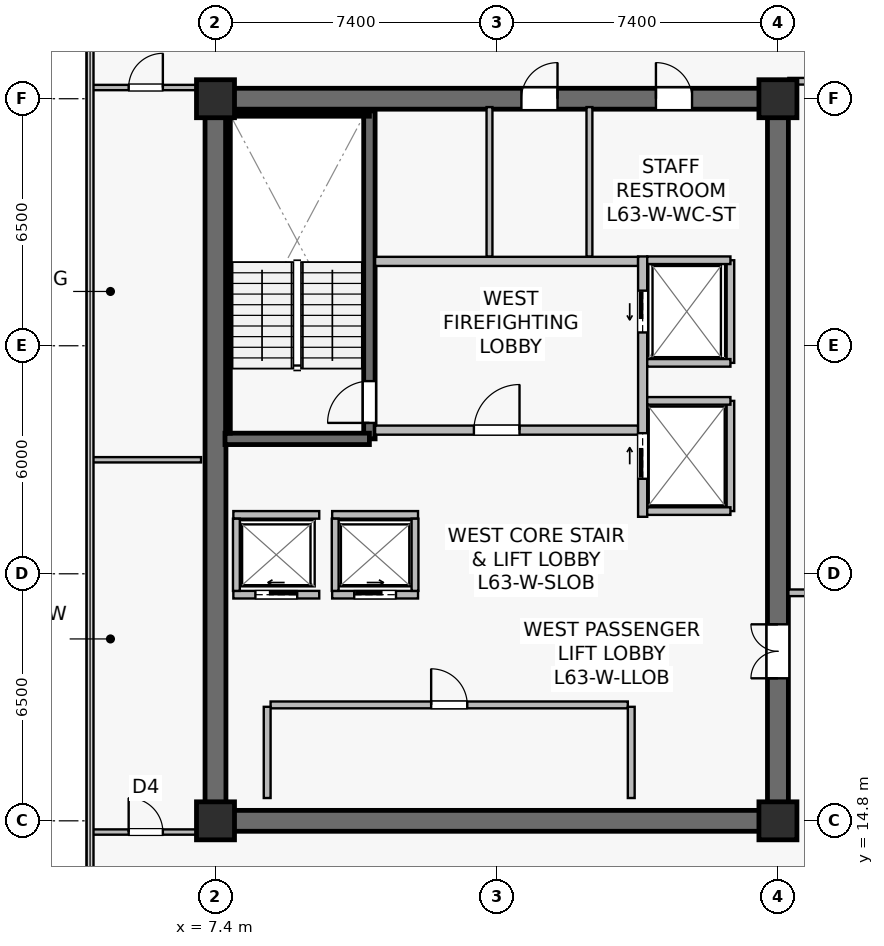
"""IFC4 building model, lengths in metres.
Left out: names, types, materials, properties, quantities, classifications, styles, units other than length and angle.
Written with IfcOpenShell. Run it as: python <this file> out.ifc"""

import sys

from ifc_helpers import new_model, si_unit, direction, frame, frame_2d, origin, origin_2d, place, context, subcontext, project, spatial, rectangle, extrude, source, transform, mapped, element, fill, save


model = new_model("IFC4")
c1 = context("Model", 3, precision=1e-05, world=origin(), true_north=direction((0.0, 1.0)))
c2 = subcontext(c1, "Body", "Model", "MODEL_VIEW")
j1 = project(units=[si_unit("LENGTHUNIT", "METRE"), si_unit("PLANEANGLEUNIT", "RADIAN")], contexts=[c1])
p1 = place(None, origin())
s1 = spatial("IfcSite", under=j1, at=p1, CompositionType="ELEMENT")
p2 = place(p1, origin())
s2 = spatial("IfcBuilding", under=s1, at=p2, CompositionType="ELEMENT")
p3 = place(p2, frame((0.0, 0.0, 262.9)))
s3 = spatial("IfcBuildingStorey", under=s2, at=p3, CompositionType="ELEMENT", Elevation=262.9)
p4 = place(p3, frame((7.125, 14.8, 0.0), z_axis=(0.0, 0.0, 1.0), x_axis=(1.0, 0.0, 0.0)))
e1 = element("IfcWall", 1, at=p4, inside=s3, PredefinedType="SHEAR", context=c2, shape_type="SweptSolid", body=[
    extrude(rectangle(XDim=15.35, YDim=0.55, at=frame_2d((7.675, 0.0))), origin(), (0.0, 0.0, 1.0), 3.8),
])
p5 = place(p3, frame((7.125, 33.8, 0.0), z_axis=(0.0, 0.0, 1.0), x_axis=(1.0, 0.0, 0.0)))
e2 = element("IfcWall", 2, at=p5, inside=s3, PredefinedType="SHEAR", context=c2, shape_type="SweptSolid", body=[
    extrude(rectangle(XDim=15.35, YDim=0.55, at=frame_2d((7.675, 0.0))), origin(), (0.0, 0.0, 1.0), 3.8),
])
p6 = place(p5, frame((8.325, 0.0, 0.0)))
e3 = element("IfcOpeningElement", 3, at=p6, cuts=e2, PredefinedType="OPENING", context=c2, shape_type="SweptSolid", body=[
    extrude(rectangle(XDim=0.95, YDim=2.15, at=frame_2d((0.475, 1.075))), frame((0.0, 0.285, 0.0), z_axis=(0.0, -1.0, 0.0), x_axis=(1.0, 0.0, 0.0)), (0.0, 0.0, 1.0), 0.57),
])
p7 = place(p5, frame((11.865, 0.0, 0.0)))
e4 = element("IfcOpeningElement", 4, at=p7, cuts=e2, PredefinedType="OPENING", context=c2, shape_type="SweptSolid", body=[
    extrude(rectangle(XDim=0.95, YDim=2.15, at=frame_2d((0.475, 1.075))), frame((0.0, 0.285, 0.0), z_axis=(0.0, -1.0, 0.0), x_axis=(1.0, 0.0, 0.0)), (0.0, 0.0, 1.0), 0.57),
])
p8 = place(p3, frame((7.4, 15.075, 0.0), z_axis=(0.0, 0.0, 1.0), x_axis=(0.0, 1.0, 0.0)))
e5 = element("IfcWall", 5, at=p8, inside=s3, PredefinedType="SHEAR", context=c2, shape_type="SweptSolid", body=[
    extrude(rectangle(XDim=18.45, YDim=0.55, at=frame_2d((9.225, 0.0))), origin(), (0.0, 0.0, 1.0), 3.8),
])
p9 = place(p3, frame((22.2, 15.075, 0.0), z_axis=(0.0, 0.0, 1.0), x_axis=(0.0, 1.0, 0.0)))
e6 = element("IfcWall", 6, at=p9, inside=s3, PredefinedType="SHEAR", context=c2, shape_type="SweptSolid", body=[
    extrude(rectangle(XDim=18.45, YDim=0.55, at=frame_2d((9.225, 0.0))), origin(), (0.0, 0.0, 1.0), 3.8),
])
p10 = place(p9, frame((3.475, 0.0, 0.0)))
e7 = element("IfcOpeningElement", 7, at=p10, cuts=e6, PredefinedType="OPENING", context=c2, shape_type="SweptSolid", body=[
    extrude(rectangle(XDim=1.42, YDim=2.2, at=frame_2d((0.71, 1.1))), frame((0.0, 0.285, 0.0), z_axis=(0.0, -1.0, 0.0), x_axis=(1.0, 0.0, 0.0)), (0.0, 0.0, 1.0), 0.57),
])
p11 = place(p3, frame((11.45, 24.85, 0.0), z_axis=(0.0, 0.0, 1.0), x_axis=(0.0, 1.0, 0.0)))
e8 = element("IfcWall", 8, at=p11, inside=s3, PredefinedType="SHEAR", context=c2, shape_type="SweptSolid", body=[
    extrude(rectangle(XDim=8.63, YDim=0.3, at=frame_2d((4.315, 0.0))), origin(), (0.0, 0.0, 1.0), 3.8),
])
p12 = place(p11, frame((0.42, 0.0, 0.0)))
e9 = element("IfcOpeningElement", 9, at=p12, cuts=e8, PredefinedType="OPENING", context=c2, shape_type="SweptSolid", body=[
    extrude(rectangle(XDim=1.1, YDim=2.15, at=frame_2d((0.55, 1.075))), frame((0.0, 0.16, 0.0), z_axis=(0.0, -1.0, 0.0), x_axis=(1.0, 0.0, 0.0)), (0.0, 0.0, 1.0), 0.32),
])
p13 = place(p3, frame((7.65, 24.85, 0.0), z_axis=(0.0, 0.0, 1.0), x_axis=(1.0, 0.0, 0.0)))
e10 = element("IfcWall", 10, at=p13, inside=s3, PredefinedType="SHEAR", context=c2, shape_type="SweptSolid", body=[
    extrude(rectangle(XDim=3.8, YDim=0.3, at=frame_2d((1.9, 0.0))), origin(), (0.0, 0.0, 1.0), 3.8),
])
p14 = place(p3, frame((7.73, 33.4, 0.0), z_axis=(0.0, 0.0, 1.0), x_axis=(1.0, 0.0, 0.0)))
e11 = element("IfcWall", 11, at=p14, inside=s3, PredefinedType="SOLIDWALL", context=c2, shape_type="SweptSolid", body=[
    extrude(rectangle(XDim=3.72, YDim=0.12, at=frame_2d((1.86, 0.0))), origin(), (0.0, 0.0, 1.0), 3.8),
])
p15 = place(p3, frame((7.73, 25.0, 0.0), z_axis=(0.0, 0.0, 1.0), x_axis=(0.0, 1.0, 0.0)))
e12 = element("IfcWall", 12, at=p15, inside=s3, PredefinedType="SOLIDWALL", context=c2, shape_type="SweptSolid", body=[
    extrude(rectangle(XDim=8.32, YDim=0.12, at=frame_2d((4.16, 0.0))), origin(), (0.0, 0.0, 1.0), 3.8),
])
m1 = source(origin(), c2, "Body", "SweptSolid", [
    extrude(rectangle(XDim=1.0, YDim=1.0, at=origin_2d()), origin(), (0.0, 0.0, 1.0), 4.1),
])
for number, where, z_axis, x_axis in (
    (13, (7.4, 14.8, 0.0), (0.0, 0.0, 1.0), (1.0, 0.0, 0.0)),
    (14, (22.2, 14.8, 0.0), (0.0, 0.0, 1.0), (1.0, 0.0, 0.0)),
    (15, (7.4, 33.8, 0.0), (0.0, 0.0, 1.0), (1.0, 0.0, 0.0)),
    (16, (22.2, 33.8, 0.0), (0.0, 0.0, 1.0), (1.0, 0.0, 0.0)),
):
    element("IfcColumn", number, at=place(p3, frame(where, z_axis=z_axis, x_axis=x_axis)), inside=s3, PredefinedType="COLUMN", context=c2, shape_type="MappedRepresentation", body=[
        mapped(m1, transform((0.0, 0.0, 0.0), scale=1.0)),
    ])
p16 = place(p3, frame((11.6, 25.08, 0.0), z_axis=(0.0, 0.0, 1.0), x_axis=(1.0, 0.0, 0.0)))
e17 = element("IfcWall", 17, at=p16, inside=s3, PredefinedType="SOLIDWALL", context=c2, shape_type="SweptSolid", body=[
    extrude(rectangle(XDim=6.92, YDim=0.24, at=frame_2d((3.46, 0.0))), origin(), (0.0, 0.0, 1.0), 3.197),
])
p17 = place(p16, frame((2.6, 0.0, 0.0)))
e18 = element("IfcOpeningElement", 18, at=p17, cuts=e17, PredefinedType="OPENING", context=c2, shape_type="SweptSolid", body=[
    extrude(rectangle(XDim=1.2, YDim=2.16, at=frame_2d((0.6, 1.08))), frame((0.0, 0.13, 0.0), z_axis=(0.0, -1.0, 0.0), x_axis=(1.0, 0.0, 0.0)), (0.0, 0.0, 1.0), 0.26),
])
p18 = place(p3, frame((11.6, 29.52, 0.0), z_axis=(0.0, 0.0, 1.0), x_axis=(1.0, 0.0, 0.0)))
e19 = element("IfcWall", 19, at=p18, inside=s3, PredefinedType="SOLIDWALL", context=c2, shape_type="SweptSolid", body=[
    extrude(rectangle(XDim=6.92, YDim=0.24, at=frame_2d((3.46, 0.0))), origin(), (0.0, 0.0, 1.0), 3.197),
])
p19 = place(p3, frame((18.64, 22.8, 0.0), z_axis=(0.0, 0.0, 1.0), x_axis=(0.0, 1.0, 0.0)))
e20 = element("IfcWall", 20, at=p19, inside=s3, PredefinedType="SOLIDWALL", context=c2, shape_type="SweptSolid", body=[
    extrude(rectangle(XDim=6.85, YDim=0.24, at=frame_2d((3.425, 0.0))), origin(), (0.0, 0.0, 1.0), 2.935),
])
p20 = place(p19, frame((4.85, 0.0, 0.0)))
e21 = element("IfcOpeningElement", 21, at=p20, cuts=e20, PredefinedType="OPENING", context=c2, shape_type="SweptSolid", body=[
    extrude(rectangle(XDim=1.1, YDim=2.22, at=frame_2d((0.55, 1.11))), frame((0.0, 0.13, 0.0), z_axis=(0.0, -1.0, 0.0), x_axis=(1.0, 0.0, 0.0)), (0.0, 0.0, 1.0), 0.26),
])
p21 = place(p19, frame((1.0, 0.0, 0.0)))
e22 = element("IfcOpeningElement", 22, at=p21, cuts=e20, PredefinedType="OPENING", context=c2, shape_type="SweptSolid", body=[
    extrude(rectangle(XDim=1.2, YDim=2.22, at=frame_2d((0.6, 1.11))), frame((0.0, 0.13, 0.0), z_axis=(0.0, -1.0, 0.0), x_axis=(1.0, 0.0, 0.0)), (0.0, 0.0, 1.0), 0.26),
])
p22 = place(p3, frame((7.87, 20.75, 0.0), z_axis=(0.0, 0.0, 1.0), x_axis=(1.0, 0.0, 0.0)))
e23 = element("IfcWall", 23, at=p22, inside=s3, PredefinedType="SOLIDWALL", context=c2, shape_type="SweptSolid", body=[
    extrude(rectangle(XDim=2.26, YDim=0.2, at=frame_2d((1.13, 0.0))), origin(), (0.0, 0.0, 1.0), 3.8),
])
p23 = place(p22, frame((0.58, 0.0, 0.0)))
e24 = element("IfcOpeningElement", 24, at=p23, cuts=e23, PredefinedType="OPENING", context=c2, shape_type="SweptSolid", body=[
    extrude(rectangle(XDim=1.1, YDim=2.22, at=frame_2d((0.55, 1.11))), frame((0.0, 0.11, 0.0), z_axis=(0.0, -1.0, 0.0), x_axis=(1.0, 0.0, 0.0)), (0.0, 0.0, 1.0), 0.22),
])
p24 = place(p3, frame((7.87, 22.85, 0.0), z_axis=(0.0, 0.0, 1.0), x_axis=(1.0, 0.0, 0.0)))
e25 = element("IfcWall", 25, at=p24, inside=s3, PredefinedType="SOLIDWALL", context=c2, shape_type="SweptSolid", body=[
    extrude(rectangle(XDim=2.26, YDim=0.2, at=frame_2d((1.13, 0.0))), origin(), (0.0, 0.0, 1.0), 3.8),
])
p25 = place(p3, frame((7.95, 20.85, 0.0), z_axis=(0.0, 0.0, 1.0), x_axis=(0.0, 1.0, 0.0)))
e26 = element("IfcWall", 26, at=p25, inside=s3, PredefinedType="SOLIDWALL", context=c2, shape_type="SweptSolid", body=[
    extrude(rectangle(XDim=1.9, YDim=0.18, at=frame_2d((0.95, 0.0))), origin(), (0.0, 0.0, 1.0), 3.8),
])
p26 = place(p3, frame((10.47, 20.75, 0.0), z_axis=(0.0, 0.0, 1.0), x_axis=(1.0, 0.0, 0.0)))
e27 = element("IfcWall", 27, at=p26, inside=s3, PredefinedType="SOLIDWALL", context=c2, shape_type="SweptSolid", body=[
    extrude(rectangle(XDim=2.26, YDim=0.2, at=frame_2d((1.13, 0.0))), origin(), (0.0, 0.0, 1.0), 3.8),
])
p27 = place(p26, frame((0.58, 0.0, 0.0)))
e28 = element("IfcOpeningElement", 28, at=p27, cuts=e27, PredefinedType="OPENING", context=c2, shape_type="SweptSolid", body=[
    extrude(rectangle(XDim=1.1, YDim=2.22, at=frame_2d((0.55, 1.11))), frame((0.0, 0.11, 0.0), z_axis=(0.0, -1.0, 0.0), x_axis=(1.0, 0.0, 0.0)), (0.0, 0.0, 1.0), 0.22),
])
p28 = place(p3, frame((10.47, 22.85, 0.0), z_axis=(0.0, 0.0, 1.0), x_axis=(1.0, 0.0, 0.0)))
e29 = element("IfcWall", 29, at=p28, inside=s3, PredefinedType="SOLIDWALL", context=c2, shape_type="SweptSolid", body=[
    extrude(rectangle(XDim=2.26, YDim=0.2, at=frame_2d((1.13, 0.0))), origin(), (0.0, 0.0, 1.0), 3.8),
])
for number, where, z_axis, x_axis in (
    (30, (10.55, 20.85, 0.0), (0.0, 0.0, 1.0), (0.0, 1.0, 0.0)),
    (31, (12.65, 20.85, 0.0), (0.0, 0.0, 1.0), (0.0, 1.0, 0.0)),
):
    element("IfcWall", number, at=place(p3, frame(where, z_axis=z_axis, x_axis=x_axis)), inside=s3, PredefinedType="SOLIDWALL", context=c2, shape_type="SweptSolid", body=[
        extrude(rectangle(XDim=1.9, YDim=0.18, at=frame_2d((0.95, 0.0))), origin(), (0.0, 0.0, 1.0), 3.8),
    ])
p29 = place(p3, frame((20.95, 26.85, 0.0), z_axis=(0.0, 0.0, 1.0), x_axis=(0.0, 1.0, 0.0)))
e32 = element("IfcWall", 32, at=p29, inside=s3, PredefinedType="SOLIDWALL", context=c2, shape_type="SweptSolid", body=[
    extrude(rectangle(XDim=2.7, YDim=0.2, at=frame_2d((1.35, 0.0))), origin(), (0.0, 0.0, 1.0), 3.8),
])
p30 = place(p3, frame((18.76, 29.55, 0.0), z_axis=(0.0, 0.0, 1.0), x_axis=(1.0, 0.0, 0.0)))
e33 = element("IfcWall", 33, at=p30, inside=s3, PredefinedType="SOLIDWALL", context=c2, shape_type="SweptSolid", body=[
    extrude(rectangle(XDim=2.19, YDim=0.2, at=frame_2d((1.095, 0.0))), origin(), (0.0, 0.0, 1.0), 3.8),
])
p31 = place(p3, frame((18.76, 26.85, 0.0), z_axis=(0.0, 0.0, 1.0), x_axis=(1.0, 0.0, 0.0)))
e34 = element("IfcWall", 34, at=p31, inside=s3, PredefinedType="SOLIDWALL", context=c2, shape_type="SweptSolid", body=[
    extrude(rectangle(XDim=2.19, YDim=0.2, at=frame_2d((1.095, 0.0))), origin(), (0.0, 0.0, 1.0), 3.197),
])
p32 = place(p3, frame((20.95, 22.95, 0.0), z_axis=(0.0, 0.0, 1.0), x_axis=(0.0, 1.0, 0.0)))
e35 = element("IfcWall", 35, at=p32, inside=s3, PredefinedType="SOLIDWALL", context=c2, shape_type="SweptSolid", body=[
    extrude(rectangle(XDim=2.9, YDim=0.2, at=frame_2d((1.45, 0.0))), origin(), (0.0, 0.0, 1.0), 2.935),
])
for number, where, z_axis, x_axis in (
    (36, (18.76, 25.85, 0.0), (0.0, 0.0, 1.0), (1.0, 0.0, 0.0)),
    (37, (18.76, 22.95, 0.0), (0.0, 0.0, 1.0), (1.0, 0.0, 0.0)),
):
    element("IfcWall", number, at=place(p3, frame(where, z_axis=z_axis, x_axis=x_axis)), inside=s3, PredefinedType="SOLIDWALL", context=c2, shape_type="SweptSolid", body=[
        extrude(rectangle(XDim=2.19, YDim=0.2, at=frame_2d((1.095, 0.0))), origin(), (0.0, 0.0, 1.0), 3.8),
    ])
p33 = place(p3, frame((8.85, 17.85, 0.0), z_axis=(0.0, 0.0, 1.0), x_axis=(1.0, 0.0, 0.0)))
e38 = element("IfcWall", 38, at=p33, inside=s3, PredefinedType="SOLIDWALL", context=c2, shape_type="SweptSolid", body=[
    extrude(rectangle(XDim=9.4, YDim=0.18, at=frame_2d((4.7, 0.0))), origin(), (0.0, 0.0, 1.0), 3.197),
])
p34 = place(p33, frame((4.225, 0.0, 0.0)))
e39 = element("IfcOpeningElement", 39, at=p34, cuts=e38, PredefinedType="OPENING", context=c2, shape_type="SweptSolid", body=[
    extrude(rectangle(XDim=0.95, YDim=2.15, at=frame_2d((0.475, 1.075))), frame((0.0, 0.1, 0.0), z_axis=(0.0, -1.0, 0.0), x_axis=(1.0, 0.0, 0.0)), (0.0, 0.0, 1.0), 0.2),
])
for number, where, z_axis, x_axis in (
    (40, (18.34, 15.4, 0.0), (0.0, 0.0, 1.0), (0.0, 1.0, 0.0)),
    (41, (8.76, 15.4, 0.0), (0.0, 0.0, 1.0), (0.0, 1.0, 0.0)),
):
    element("IfcWall", number, at=place(p3, frame(where, z_axis=z_axis, x_axis=x_axis)), inside=s3, PredefinedType="SOLIDWALL", context=c2, shape_type="SweptSolid", body=[
        extrude(rectangle(XDim=2.4, YDim=0.18, at=frame_2d((1.2, 0.0))), origin(), (0.0, 0.0, 1.0), 3.8),
    ])
p35 = place(p3, frame((14.61, 29.65, 0.0), z_axis=(0.0, 0.0, 1.0), x_axis=(0.0, 1.0, 0.0)))
e42 = element("IfcWall", 42, at=p35, inside=s3, PredefinedType="PLUMBINGWALL", context=c2, shape_type="SweptSolid", body=[
    extrude(rectangle(XDim=3.93, YDim=0.155, at=frame_2d((1.965, 0.0))), origin(), (0.0, 0.0, 1.0), 3.197),
])
p36 = place(p3, frame((17.24, 29.65, 0.0), z_axis=(0.0, 0.0, 1.0), x_axis=(0.0, 1.0, 0.0)))
e43 = element("IfcWall", 43, at=p36, inside=s3, PredefinedType="PLUMBINGWALL", context=c2, shape_type="SweptSolid", body=[
    extrude(rectangle(XDim=3.93, YDim=0.155, at=frame_2d((1.965, 0.0))), origin(), (0.0, 0.0, 1.0), 3.8),
])
p37 = place(p3, frame((22.475, 34.26, 0.0), z_axis=(0.0, 0.0, 1.0), x_axis=(1.0, 0.0, 0.0)))
e44 = element("IfcWall", 44, at=p37, inside=s3, PredefinedType="PARTITIONING", context=c2, shape_type="SweptSolid", body=[
    extrude(rectangle(XDim=4.025, YDim=0.175, at=frame_2d((2.012, 0.0))), origin(), (0.0, 0.0, 1.0), 3.535),
])
p38 = place(p3, frame((22.475, 20.8, 0.0), z_axis=(0.0, 0.0, 1.0), x_axis=(1.0, 0.0, 0.0)))
e45 = element("IfcWall", 45, at=p38, inside=s3, PredefinedType="PARTITIONING", context=c2, shape_type="SweptSolid", body=[
    extrude(rectangle(XDim=4.025, YDim=0.175, at=frame_2d((2.012, 0.0))), origin(), (0.0, 0.0, 1.0), 3.8),
])
p39 = place(p38, frame((1.35, 0.0, 0.0)))
e46 = element("IfcOpeningElement", 46, at=p39, cuts=e45, PredefinedType="OPENING", context=c2, shape_type="SweptSolid", body=[
    extrude(rectangle(XDim=0.95, YDim=2.15, at=frame_2d((0.475, 1.075))), frame((0.0, 0.098, 0.0), z_axis=(0.0, -1.0, 0.0), x_axis=(1.0, 0.0, 0.0)), (0.0, 0.0, 1.0), 0.195),
])
p40 = place(p3, frame((4.11, 24.3, 0.0), z_axis=(0.0, 0.0, 1.0), x_axis=(1.0, 0.0, 0.0)))
e47 = element("IfcWall", 47, at=p40, inside=s3, PredefinedType="PARTITIONING", context=c2, shape_type="SweptSolid", body=[
    extrude(rectangle(XDim=2.91, YDim=0.14, at=frame_2d((1.455, 0.0))), origin(), (0.0, 0.0, 1.0), 3.8),
])
p41 = place(p3, frame((4.11, 14.505, 0.0), z_axis=(0.0, 0.0, 1.0), x_axis=(1.0, 0.0, 0.0)))
e48 = element("IfcWall", 48, at=p41, inside=s3, PredefinedType="PARTITIONING", context=c2, shape_type="SweptSolid", body=[
    extrude(rectangle(XDim=2.91, YDim=0.14, at=frame_2d((1.455, 0.0))), origin(), (0.0, 0.0, 1.0), 3.8),
])
p42 = place(p41, frame((1.005, 0.0, 0.0)))
e49 = element("IfcOpeningElement", 49, at=p42, cuts=e48, PredefinedType="OPENING", context=c2, shape_type="SweptSolid", body=[
    extrude(rectangle(XDim=0.9, YDim=2.1, at=frame_2d((0.45, 1.05))), frame((0.0, 0.08, 0.0), z_axis=(0.0, -1.0, 0.0), x_axis=(1.0, 0.0, 0.0)), (0.0, 0.0, 1.0), 0.16),
])
p43 = place(p3, frame((4.11, 34.095, 0.0), z_axis=(0.0, 0.0, 1.0), x_axis=(1.0, 0.0, 0.0)))
e50 = element("IfcWall", 50, at=p43, inside=s3, PredefinedType="PARTITIONING", context=c2, shape_type="SweptSolid", body=[
    extrude(rectangle(XDim=2.91, YDim=0.14, at=frame_2d((1.455, 0.0))), origin(), (0.0, 0.0, 1.0), 3.8),
])
p44 = place(p43, frame((1.005, 0.0, 0.0)))
e51 = element("IfcOpeningElement", 51, at=p44, cuts=e50, PredefinedType="OPENING", context=c2, shape_type="SweptSolid", body=[
    extrude(rectangle(XDim=0.9, YDim=2.1, at=frame_2d((0.45, 1.05))), frame((0.0, 0.08, 0.0), z_axis=(0.0, -1.0, 0.0), x_axis=(1.0, 0.0, 0.0)), (0.0, 0.0, 1.0), 0.16),
])
m2 = source(origin(), c2, "Body", "SweptSolid", [
    extrude(rectangle(XDim=1.1, YDim=2.15, at=frame_2d((0.55, 1.075))), frame((0.0, 0.025, 0.0), z_axis=(0.0, -1.0, 0.0), x_axis=(1.0, 0.0, 0.0)), (0.0, 0.0, 1.0), 0.05),
])
p45 = place(p12, origin())
e52 = element("IfcDoor", 52, at=p45, inside=s3, OperationType="SINGLE_SWING_LEFT", PredefinedType="DOOR", context=c2, shape_type="MappedRepresentation", body=[
    mapped(m2, transform((0.0, 0.0, 0.0), scale=1.0)),
])
fill(e9, e52)
m3 = source(origin(), c2, "Body", "SweptSolid", [
    extrude(rectangle(XDim=1.2, YDim=2.16, at=frame_2d((0.6, 1.08))), frame((0.0, 0.025, 0.0), z_axis=(0.0, -1.0, 0.0), x_axis=(1.0, 0.0, 0.0)), (0.0, 0.0, 1.0), 0.05),
])
p46 = place(p17, origin())
e53 = element("IfcDoor", 53, at=p46, inside=s3, OperationType="SINGLE_SWING_RIGHT", PredefinedType="DOOR", context=c2, shape_type="MappedRepresentation", body=[
    mapped(m3, transform((0.0, 0.0, 0.0), scale=1.0)),
])
fill(e18, e53)
m4 = source(origin(), c2, "Body", "SweptSolid", [
    extrude(rectangle(XDim=1.1, YDim=2.22, at=frame_2d((0.55, 1.11))), frame((0.0, 0.025, 0.0), z_axis=(0.0, -1.0, 0.0), x_axis=(1.0, 0.0, 0.0)), (0.0, 0.0, 1.0), 0.05),
])
p47 = place(p23, origin())
e54 = element("IfcDoor", 54, at=p47, inside=s3, OperationType="SLIDING_TO_LEFT", PredefinedType="USERDEFINED", context=c2, shape_type="MappedRepresentation", body=[
    mapped(m4, transform((0.0, 0.0, 0.0), scale=1.0)),
])
fill(e24, e54)
p48 = place(p27, origin())
e55 = element("IfcDoor", 55, at=p48, inside=s3, OperationType="SLIDING_TO_RIGHT", PredefinedType="USERDEFINED", context=c2, shape_type="MappedRepresentation", body=[
    mapped(m4, transform((0.0, 0.0, 0.0), scale=1.0)),
])
fill(e28, e55)
p49 = place(p20, origin())
e56 = element("IfcDoor", 56, at=p49, inside=s3, OperationType="SLIDING_TO_LEFT", PredefinedType="USERDEFINED", context=c2, shape_type="MappedRepresentation", body=[
    mapped(m4, transform((0.0, 0.0, 0.0), scale=1.0)),
])
fill(e21, e56)
m5 = source(origin(), c2, "Body", "SweptSolid", [
    extrude(rectangle(XDim=1.2, YDim=2.22, at=frame_2d((0.6, 1.11))), frame((0.0, 0.025, 0.0), z_axis=(0.0, -1.0, 0.0), x_axis=(1.0, 0.0, 0.0)), (0.0, 0.0, 1.0), 0.05),
])
p50 = place(p21, origin())
e57 = element("IfcDoor", 57, at=p50, inside=s3, OperationType="SLIDING_TO_RIGHT", PredefinedType="USERDEFINED", context=c2, shape_type="MappedRepresentation", body=[
    mapped(m5, transform((0.0, 0.0, 0.0), scale=1.0)),
])
fill(e22, e57)
m6 = source(origin(), c2, "Body", "SweptSolid", [
    extrude(rectangle(XDim=0.95, YDim=2.15, at=frame_2d((0.475, 1.075))), frame((0.0, 0.025, 0.0), z_axis=(0.0, -1.0, 0.0), x_axis=(1.0, 0.0, 0.0)), (0.0, 0.0, 1.0), 0.05),
])
p51 = place(p34, origin())
e58 = element("IfcDoor", 58, at=p51, inside=s3, OperationType="SINGLE_SWING_LEFT", PredefinedType="DOOR", context=c2, shape_type="MappedRepresentation", body=[
    mapped(m6, transform((0.0, 0.0, 0.0), scale=1.0)),
])
fill(e39, e58)
m7 = source(origin(), c2, "Body", "SweptSolid", [
    extrude(rectangle(XDim=1.42, YDim=2.2, at=frame_2d((0.71, 1.1))), frame((0.0, 0.025, 0.0), z_axis=(0.0, -1.0, 0.0), x_axis=(1.0, 0.0, 0.0)), (0.0, 0.0, 1.0), 0.05),
])
p52 = place(p10, origin())
e59 = element("IfcDoor", 59, at=p52, inside=s3, OperationType="DOUBLE_DOOR_SINGLE_SWING", PredefinedType="DOOR", context=c2, shape_type="MappedRepresentation", body=[
    mapped(m7, transform((0.0, 0.0, 0.0), scale=1.0)),
])
fill(e7, e59)
p53 = place(p6, origin())
e60 = element("IfcDoor", 60, at=p53, inside=s3, OperationType="SINGLE_SWING_RIGHT", PredefinedType="DOOR", context=c2, shape_type="MappedRepresentation", body=[
    mapped(m6, transform((0.0, 0.0, 0.0), scale=1.0)),
])
fill(e3, e60)
p54 = place(p7, origin())
e61 = element("IfcDoor", 61, at=p54, inside=s3, OperationType="SINGLE_SWING_LEFT", PredefinedType="DOOR", context=c2, shape_type="MappedRepresentation", body=[
    mapped(m6, transform((0.0, 0.0, 0.0), scale=1.0)),
])
fill(e4, e61)
m8 = source(origin(), c2, "Body", "SweptSolid", [
    extrude(rectangle(XDim=0.9, YDim=2.1, at=frame_2d((0.45, 1.05))), frame((0.0, 0.025, 0.0), z_axis=(0.0, -1.0, 0.0), x_axis=(1.0, 0.0, 0.0)), (0.0, 0.0, 1.0), 0.05),
])
p55 = place(p42, origin())
e62 = element("IfcDoor", 62, at=p55, inside=s3, OperationType="SINGLE_SWING_LEFT", PredefinedType="DOOR", context=c2, shape_type="MappedRepresentation", body=[
    mapped(m8, transform((0.0, 0.0, 0.0), scale=1.0)),
])
fill(e49, e62)
p56 = place(p44, origin())
e63 = element("IfcDoor", 63, at=p56, inside=s3, OperationType="SINGLE_SWING_RIGHT", PredefinedType="DOOR", context=c2, shape_type="MappedRepresentation", body=[
    mapped(m8, transform((0.0, 0.0, 0.0), scale=1.0)),
])
fill(e51, e63)
save(model, sys.argv[1])
